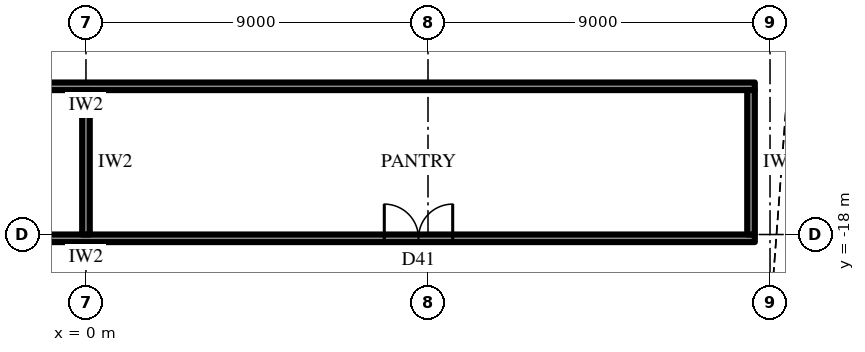
"""IFC4 building model, lengths in metres.
Left out: names, types, materials, properties, quantities, classifications, styles, units other than length and angle.
Written with IfcOpenShell. Run it as: python <this file> out.ifc"""

import sys

from ifc_helpers import new_model, si_unit, direction, frame, frame_2d, origin, place, context, subcontext, project, spatial, rectangle, extrude, element, fill, save


model = new_model("IFC4")
c1 = context("Model", 3, precision=1e-05, world=origin(), true_north=direction((0.0, 1.0)))
c2 = subcontext(c1, "Body", "Model", "MODEL_VIEW")
j1 = project(units=[si_unit("LENGTHUNIT", "METRE"), si_unit("PLANEANGLEUNIT", "RADIAN")], contexts=[c1])
p1 = place(None, origin())
s1 = spatial("IfcSite", under=j1, at=p1, CompositionType="ELEMENT")
p2 = place(p1, origin())
s2 = spatial("IfcBuilding", under=s1, at=p2, CompositionType="ELEMENT")
p3 = place(p2, frame((0.0, 0.0, 199.3)))
s3 = spatial("IfcBuildingStorey", under=s2, at=p3, CompositionType="ELEMENT", Elevation=199.3)
p4 = place(p3, frame((17.6, -14.1, 0.0), z_axis=(0.0, 0.0, 1.0), x_axis=(-1.0, 0.0, 0.0)))
e1 = element("IfcWall", 1, at=p4, inside=s3, PredefinedType="PARTITIONING", context=c2, shape_type="SweptSolid", body=[
    extrude(rectangle(XDim=35.2, YDim=0.2, at=frame_2d((17.6, 0.0))), origin(), (0.0, 0.0, 1.0), 3.9),
])
p5 = place(p3, frame((17.6, -18.1, 0.0), z_axis=(0.0, 0.0, 1.0), x_axis=(-1.0, 0.0, 0.0)))
e2 = element("IfcWall", 2, at=p5, inside=s3, PredefinedType="PARTITIONING", context=c2, shape_type="SweptSolid", body=[
    extrude(rectangle(XDim=35.2, YDim=0.2, at=frame_2d((17.6, 0.0))), origin(), (0.0, 0.0, 1.0), 3.9),
])
p6 = place(p5, frame((7.95, 0.0, 0.0)))
e3 = element("IfcOpeningElement", 3, at=p6, cuts=e2, PredefinedType="OPENING", context=c2, shape_type="SweptSolid", body=[
    extrude(rectangle(XDim=1.8, YDim=2.4, at=frame_2d((0.9, 1.2))), frame((0.0, 0.11, 0.0), z_axis=(0.0, -1.0, 0.0), x_axis=(1.0, 0.0, 0.0)), (0.0, 0.0, 1.0), 0.22),
])
p7 = place(p5, frame((25.45, 0.0, 0.0)))
e4 = element("IfcOpeningElement", 4, at=p7, cuts=e2, PredefinedType="OPENING", context=c2, shape_type="SweptSolid", body=[
    extrude(rectangle(XDim=1.8, YDim=2.4, at=frame_2d((0.9, 1.2))), frame((0.0, 0.11, 0.0), z_axis=(0.0, -1.0, 0.0), x_axis=(1.0, 0.0, 0.0)), (0.0, 0.0, 1.0), 0.22),
])
p8 = place(p3, frame((17.5, -14.2, 0.0), z_axis=(0.0, 0.0, 1.0), x_axis=(0.0, -1.0, 0.0)))
e5 = element("IfcWall", 5, at=p8, inside=s3, PredefinedType="PARTITIONING", context=c2, shape_type="SweptSolid", body=[
    extrude(rectangle(XDim=3.8, YDim=0.2, at=frame_2d((1.9, 0.0))), origin(), (0.0, 0.0, 1.0), 3.9),
])
p9 = place(p3, frame((0.0, -14.2, 0.0), z_axis=(0.0, 0.0, 1.0), x_axis=(0.0, -1.0, 0.0)))
e6 = element("IfcWall", 6, at=p9, inside=s3, PredefinedType="PARTITIONING", context=c2, shape_type="SweptSolid", body=[
    extrude(rectangle(XDim=3.8, YDim=0.2, at=frame_2d((1.9, 0.0))), origin(), (0.0, 0.0, 1.0), 2.844),
])
p10 = place(p6, frame((1.8, 0.0, 0.0), z_axis=(0.0, 0.0, 1.0), x_axis=(-1.0, 0.0, 0.0)))
e7 = element("IfcDoor", 7, at=p10, inside=s3, OperationType="DOUBLE_DOOR_SINGLE_SWING", PredefinedType="DOOR", context=c2, shape_type="SweptSolid", body=[
    extrude(rectangle(XDim=1.8, YDim=2.4, at=frame_2d((0.9, 1.2))), frame((0.0, 0.025, 0.0), z_axis=(0.0, -1.0, 0.0), x_axis=(1.0, 0.0, 0.0)), (0.0, 0.0, 1.0), 0.05),
])
fill(e3, e7)
save(model, sys.argv[1])
